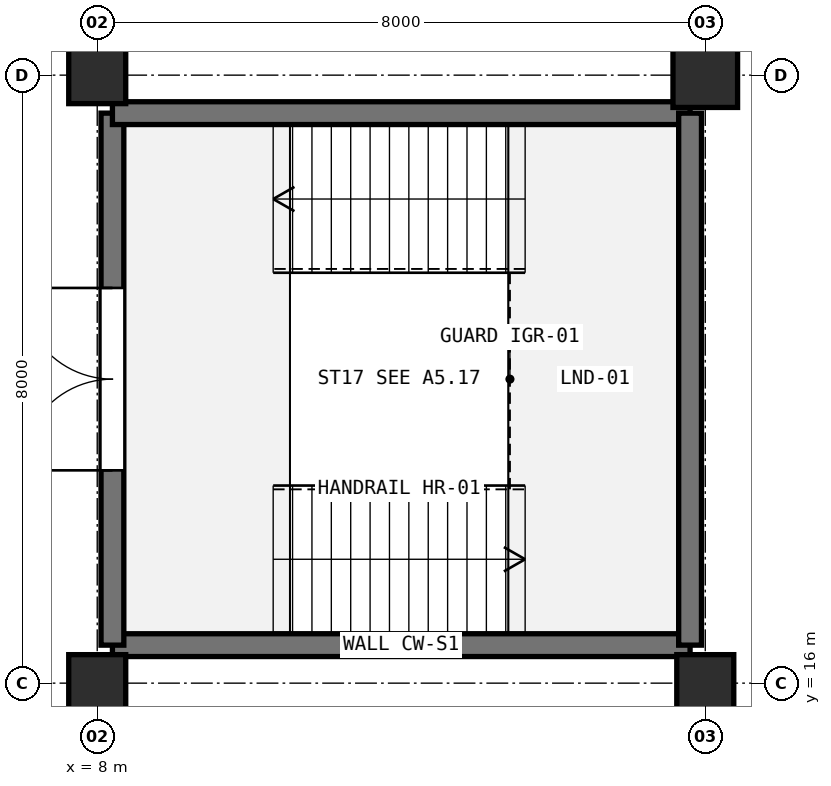
"""IFC4 building model, lengths in metres.
Left out: names, types, materials, properties, quantities, classifications, styles, units other than length and angle.
Written with IfcOpenShell. Run it as: python <this file> out.ifc"""

import sys

from ifc_helpers import new_model, si_unit, direction, frame, frame_2d, origin, origin_2d, place, context, subcontext, project, spatial, rectangle, extrude, element, fill, save


model = new_model("IFC4")
c1 = context("Model", 3, precision=1e-05, world=origin(), true_north=direction((0.0, 1.0)))
c2 = subcontext(c1, "Body", "Model", "MODEL_VIEW")
j1 = project(units=[si_unit("LENGTHUNIT", "METRE"), si_unit("PLANEANGLEUNIT", "RADIAN")], contexts=[c1])
p1 = place(None, origin())
s1 = spatial("IfcSite", under=j1, at=p1, CompositionType="ELEMENT")
p2 = place(p1, origin())
s2 = spatial("IfcBuilding", under=s1, at=p2, CompositionType="ELEMENT")
p3 = place(p2, frame((0.0, 0.0, -4.8)))
s3 = spatial("IfcBuildingStorey", under=s2, at=p3, CompositionType="ELEMENT", Elevation=-4.8)
for number, where, z_axis, x_axis in (
    (1, (8.0, 16.0, 0.0), (0.0, 0.0, 1.0), (1.0, 0.0, 0.0)),
    (2, (8.0, 24.0, 0.0), (0.0, 0.0, 1.0), (1.0, 0.0, 0.0)),
    (3, (16.0, 16.0, 0.0), (0.0, 0.0, 1.0), (1.0, 0.0, 0.0)),
):
    element("IfcColumn", number, at=place(p3, frame(where, z_axis=z_axis, x_axis=x_axis)), inside=s3, PredefinedType="COLUMN", context=c2, shape_type="SweptSolid", body=[
        extrude(rectangle(XDim=0.75, YDim=0.75, at=origin_2d()), origin(), (0.0, 0.0, 1.0), 4.8),
    ])
p4 = place(p3, frame((16.0, 24.0, 0.0), z_axis=(0.0, 0.0, 1.0), x_axis=(1.0, 0.0, 0.0)))
e4 = element("IfcColumn", 4, at=p4, inside=s3, PredefinedType="COLUMN", context=c2, shape_type="SweptSolid", body=[
    extrude(rectangle(XDim=0.85, YDim=0.85, at=origin_2d()), origin(), (0.0, 0.0, 1.0), 4.8),
])
p5 = place(p3, frame((15.8, 16.5, 0.0), z_axis=(0.0, 0.0, 1.0), x_axis=(-1.0, 0.0, 0.0)))
e5 = element("IfcWall", 5, at=p5, inside=s3, PredefinedType="SHEAR", context=c2, shape_type="SweptSolid", body=[
    extrude(rectangle(XDim=7.6, YDim=0.3, at=frame_2d((3.8, 0.0))), origin(), (0.0, 0.0, 1.0), 4.46),
])
p6 = place(p3, frame((8.2, 16.5, 0.0), z_axis=(0.0, 0.0, 1.0), x_axis=(0.0, 1.0, 0.0)))
e6 = element("IfcWall", 6, at=p6, inside=s3, PredefinedType="SHEAR", context=c2, shape_type="SweptSolid", body=[
    extrude(rectangle(XDim=7.0, YDim=0.3, at=frame_2d((3.5, 0.0))), origin(), (0.0, 0.0, 1.0), 4.46),
])
p7 = place(p6, frame((2.3, 0.0, 0.0)))
e7 = element("IfcOpeningElement", 7, at=p7, cuts=e6, PredefinedType="OPENING", context=c2, shape_type="SweptSolid", body=[
    extrude(rectangle(XDim=2.4, YDim=2.2, at=frame_2d((1.2, 1.1))), frame((0.0, 0.16, 0.0), z_axis=(0.0, -1.0, 0.0), x_axis=(1.0, 0.0, 0.0)), (0.0, 0.0, 1.0), 0.32),
])
p8 = place(p3, frame((8.2, 23.5, 0.0), z_axis=(0.0, 0.0, 1.0), x_axis=(1.0, 0.0, 0.0)))
e8 = element("IfcWall", 8, at=p8, inside=s3, PredefinedType="SHEAR", context=c2, shape_type="SweptSolid", body=[
    extrude(rectangle(XDim=7.6, YDim=0.3, at=frame_2d((3.8, 0.0))), origin(), (0.0, 0.0, 1.0), 4.46),
])
p9 = place(p3, frame((15.8, 23.5, 0.0), z_axis=(0.0, 0.0, 1.0), x_axis=(0.0, -1.0, 0.0)))
e9 = element("IfcWall", 9, at=p9, inside=s3, PredefinedType="SHEAR", context=c2, shape_type="SweptSolid", body=[
    extrude(rectangle(XDim=7.0, YDim=0.3, at=frame_2d((3.5, 0.0))), origin(), (0.0, 0.0, 1.0), 4.46),
])
p10 = place(p7, frame((2.4, 0.0, 0.0), z_axis=(0.0, 0.0, 1.0), x_axis=(-1.0, 0.0, 0.0)))
e10 = element("IfcDoor", 10, at=p10, inside=s3, OperationType="DOUBLE_DOOR_SINGLE_SWING", PredefinedType="DOOR", context=c2, shape_type="SweptSolid", body=[
    extrude(rectangle(XDim=2.4, YDim=2.2, at=frame_2d((1.2, 1.1))), frame((0.0, 0.025, 0.0), z_axis=(0.0, -1.0, 0.0), x_axis=(1.0, 0.0, 0.0)), (0.0, 0.0, 1.0), 0.05),
])
fill(e7, e10)
save(model, sys.argv[1])
